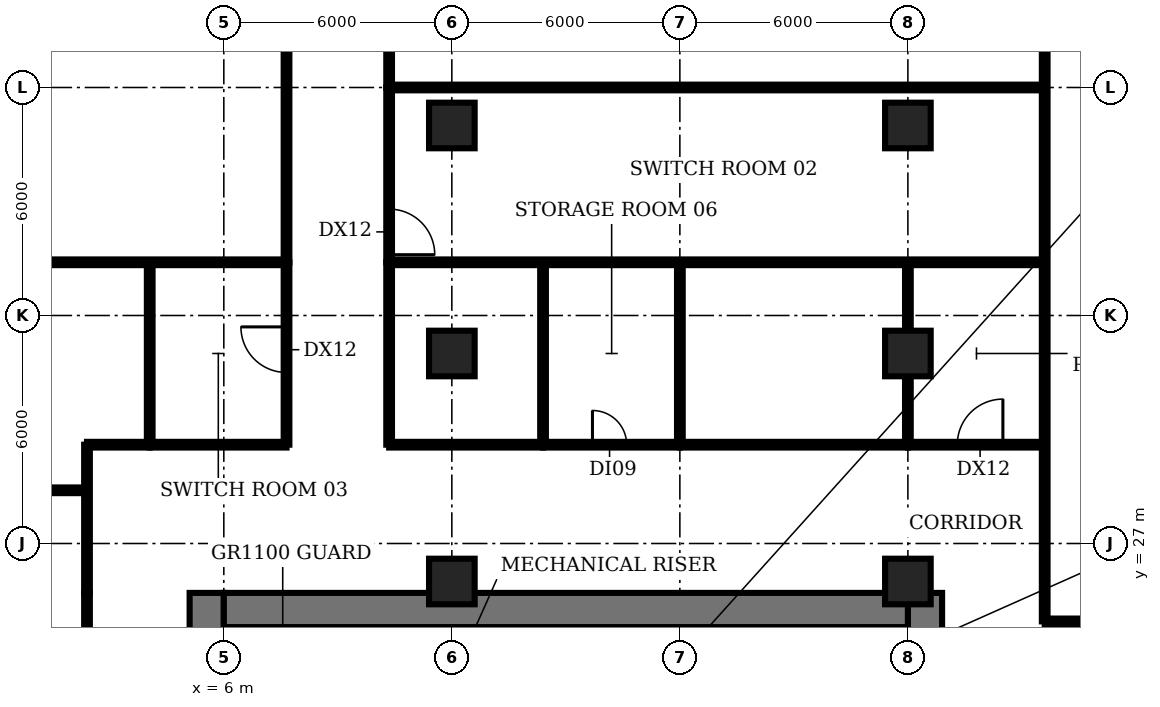
"""IFC4 building model, lengths in metres.
Left out: names, types, materials, properties, quantities, classifications, styles, units other than length and angle.
Written with IfcOpenShell. Run it as: python <this file> out.ifc"""

import sys

from ifc_helpers import new_model, si_unit, direction, frame, frame_2d, origin, origin_2d, place, context, subcontext, project, spatial, rectangle, extrude, element, fill, save


model = new_model("IFC4")
c1 = context("Model", 3, precision=1e-05, world=origin(), true_north=direction((0.0, 1.0)))
c2 = subcontext(c1, "Body", "Model", "MODEL_VIEW")
j1 = project(units=[si_unit("LENGTHUNIT", "METRE"), si_unit("PLANEANGLEUNIT", "RADIAN")], contexts=[c1])
p1 = place(None, origin())
s1 = spatial("IfcSite", under=j1, at=p1, CompositionType="ELEMENT")
p2 = place(p1, origin())
s2 = spatial("IfcBuilding", under=s1, at=p2, CompositionType="ELEMENT")
p3 = place(p2, frame((0.0, 0.0, -6.0)))
s3 = spatial("IfcBuildingStorey", under=s2, at=p3, CompositionType="ELEMENT", Elevation=-6.0)
for number, where, z_axis, x_axis in (
    (1, (12.0, 26.0, -0.3), (0.0, 0.0, 1.0), (1.0, 0.0, 0.0)),
    (2, (12.0, 32.0, -0.3), (0.0, 0.0, 1.0), (1.0, 0.0, 0.0)),
    (3, (12.0, 38.0, -0.3), (0.0, 0.0, 1.0), (1.0, 0.0, 0.0)),
    (4, (24.0, 26.0, -0.3), (0.0, 0.0, 1.0), (1.0, 0.0, 0.0)),
    (5, (24.0, 32.0, -0.3), (0.0, 0.0, 1.0), (1.0, 0.0, 0.0)),
    (6, (24.0, 38.0, -0.3), (0.0, 0.0, 1.0), (1.0, 0.0, 0.0)),
):
    element("IfcColumn", number, at=place(p3, frame(where, z_axis=z_axis, x_axis=x_axis)), inside=s3, PredefinedType="COLUMN", context=c2, shape_type="SweptSolid", body=[
        extrude(rectangle(XDim=1.2, YDim=1.2, at=origin_2d()), origin(), (0.0, 0.0, 1.0), 5.95),
    ])
p4 = place(p3, frame((9.275, 18.375, 0.0), z_axis=(0.0, 0.0, 1.0), x_axis=(0.0, 1.0, 0.0)))
e7 = element("IfcWall", 7, at=p4, inside=s3, PredefinedType="SHEAR", context=c2, shape_type="SweptSolid", body=[
    extrude(rectangle(XDim=6.425, YDim=0.25, at=frame_2d((3.212, 0.0))), origin(), (0.0, 0.0, 1.0), 5.65),
])
for number, where, z_axis, x_axis in (
    (8, (15.1, 22.9, 0.0), (0.0, 0.0, 1.0), (0.0, 1.0, 0.0)),
    (9, (20.7, 22.9, 0.0), (0.0, 0.0, 1.0), (0.0, 1.0, 0.0)),
):
    element("IfcWall", number, at=place(p3, frame(where, z_axis=z_axis, x_axis=x_axis)), inside=s3, PredefinedType="SHEAR", context=c2, shape_type="SweptSolid", body=[
        extrude(rectangle(XDim=1.9, YDim=0.2, at=frame_2d((0.95, 0.0))), origin(), (0.0, 0.0, 1.0), 5.65),
    ])
p5 = place(p3, frame((5.55, 4.5, 0.0), z_axis=(0.0, 0.0, 1.0), x_axis=(0.0, 1.0, 0.0)))
e10 = element("IfcWall", 10, at=p5, inside=s3, PredefinedType="SHEAR", context=c2, shape_type="SweptSolid", body=[
    extrude(rectangle(XDim=21.2, YDim=0.9, at=frame_2d((10.6, 0.0))), origin(), (0.0, 0.0, 1.0), 5.65),
])
p6 = place(p5, frame((7.6, 0.0, 0.0)))
e11 = element("IfcOpeningElement", 11, at=p6, cuts=e10, PredefinedType="OPENING", context=c2, shape_type="SweptSolid", body=[
    extrude(rectangle(XDim=1.2, YDim=2.1, at=frame_2d((0.6, 1.05))), frame((0.0, 0.46, 0.0), z_axis=(0.0, -1.0, 0.0), x_axis=(1.0, 0.0, 0.0)), (0.0, 0.0, 1.0), 0.92),
])
p7 = place(p5, frame((14.15, 0.0, 0.0)))
e12 = element("IfcOpeningElement", 12, at=p7, cuts=e10, PredefinedType="OPENING", context=c2, shape_type="SweptSolid", body=[
    extrude(rectangle(XDim=1.2, YDim=2.1, at=frame_2d((0.6, 1.05))), frame((0.0, 0.46, 0.0), z_axis=(0.0, -1.0, 0.0), x_axis=(1.0, 0.0, 0.0)), (0.0, 0.0, 1.0), 0.92),
])
p8 = place(p3, frame((24.45, 25.7, 0.0), z_axis=(0.0, 0.0, 1.0), x_axis=(0.0, -1.0, 0.0)))
e13 = element("IfcWall", 13, at=p8, inside=s3, PredefinedType="SHEAR", context=c2, shape_type="SweptSolid", body=[
    extrude(rectangle(XDim=21.2, YDim=0.9, at=frame_2d((10.6, 0.0))), origin(), (0.0, 0.0, 1.0), 5.65),
])
p9 = place(p8, frame((12.45, 0.0, 0.0)))
e14 = element("IfcOpeningElement", 14, at=p9, cuts=e13, PredefinedType="OPENING", context=c2, shape_type="SweptSolid", body=[
    extrude(rectangle(XDim=0.9, YDim=2.1, at=frame_2d((0.45, 1.05))), frame((0.0, 0.46, 0.0), z_axis=(0.0, -1.0, 0.0), x_axis=(1.0, 0.0, 0.0)), (0.0, 0.0, 1.0), 0.92),
])
p10 = place(p8, frame((6.45, 0.0, 0.0)))
e15 = element("IfcOpeningElement", 15, at=p10, cuts=e13, PredefinedType="OPENING", context=c2, shape_type="SweptSolid", body=[
    extrude(rectangle(XDim=2.0, YDim=2.1, at=frame_2d((1.0, 1.05))), frame((0.0, 0.46, 0.0), z_axis=(0.0, -1.0, 0.0), x_axis=(1.0, 0.0, 0.0)), (0.0, 0.0, 1.0), 0.92),
])
p11 = place(p3, frame((6.0, 25.25, 0.0), z_axis=(0.0, 0.0, 1.0), x_axis=(1.0, 0.0, 0.0)))
e16 = element("IfcWall", 16, at=p11, inside=s3, PredefinedType="SHEAR", context=c2, shape_type="SweptSolid", body=[
    extrude(rectangle(XDim=18.0, YDim=0.9, at=frame_2d((9.0, 0.0))), origin(), (0.0, 0.0, 1.0), 5.65),
])
p12 = place(p3, frame((-7.09, 28.4, 0.0), z_axis=(0.0, 0.0, 1.0), x_axis=(1.0, 0.0, 0.0)))
e17 = element("IfcWall", 17, at=p12, inside=s3, PredefinedType="PARTITIONING", context=c2, shape_type="SweptSolid", body=[
    extrude(rectangle(XDim=9.49, YDim=0.15, at=frame_2d((4.745, 0.0))), origin(), (0.0, 0.0, 1.0), 4.7),
])
p13 = place(p3, frame((-7.09, 34.4, 0.0), z_axis=(0.0, 0.0, 1.0), x_axis=(1.0, 0.0, 0.0)))
e18 = element("IfcWall", 18, at=p13, inside=s3, PredefinedType="PARTITIONING", context=c2, shape_type="SweptSolid", body=[
    extrude(rectangle(XDim=14.74, YDim=0.15, at=frame_2d((7.37, 0.0))), origin(), (0.0, 0.0, 1.0), 4.7),
])
p14 = place(p3, frame((2.4, 4.5, 0.0), z_axis=(0.0, 0.0, 1.0), x_axis=(0.0, 1.0, 0.0)))
e19 = element("IfcWall", 19, at=p14, inside=s3, PredefinedType="PARTITIONING", context=c2, shape_type="SweptSolid", body=[
    extrude(rectangle(XDim=21.2, YDim=0.15, at=frame_2d((10.6, 0.0))), origin(), (0.0, 0.0, 1.0), 4.7),
])
p15 = place(p14, frame((11.1, 0.0, 0.0)))
e20 = element("IfcOpeningElement", 20, at=p15, cuts=e19, PredefinedType="OPENING", context=c2, shape_type="SweptSolid", body=[
    extrude(rectangle(XDim=0.9, YDim=2.1, at=frame_2d((0.45, 1.05))), frame((0.0, 0.085, 0.0), z_axis=(0.0, -1.0, 0.0), x_axis=(1.0, 0.0, 0.0)), (0.0, 0.0, 1.0), 0.17),
])
p16 = place(p3, frame((2.4, 25.7, 0.0), z_axis=(0.0, 0.0, 1.0), x_axis=(0.0, 1.0, 0.0)))
e21 = element("IfcWall", 21, at=p16, inside=s3, PredefinedType="PARTITIONING", context=c2, shape_type="SweptSolid", body=[
    extrude(rectangle(XDim=3.9, YDim=0.15, at=frame_2d((1.95, 0.0))), origin(), (0.0, 0.0, 1.0), 4.7),
])
p17 = place(p3, frame((2.4, 29.6, 0.0), z_axis=(0.0, 0.0, 1.0), x_axis=(1.0, 0.0, 0.0)))
e22 = element("IfcWall", 22, at=p17, inside=s3, PredefinedType="PARTITIONING", context=c2, shape_type="SweptSolid", body=[
    extrude(rectangle(XDim=1.65, YDim=0.15, at=frame_2d((0.825, 0.0))), origin(), (0.0, 0.0, 1.0), 4.7),
])
p18 = place(p3, frame((4.05, 29.6, 0.0), z_axis=(0.0, 0.0, 1.0), x_axis=(0.0, 1.0, 0.0)))
e23 = element("IfcWall", 23, at=p18, inside=s3, PredefinedType="PARTITIONING", context=c2, shape_type="SweptSolid", body=[
    extrude(rectangle(XDim=4.8, YDim=0.15, at=frame_2d((2.4, 0.0))), origin(), (0.0, 0.0, 1.0), 4.7),
])
p19 = place(p3, frame((4.05, 29.6, 0.0), z_axis=(0.0, 0.0, 1.0), x_axis=(1.0, 0.0, 0.0)))
e24 = element("IfcWall", 24, at=p19, inside=s3, PredefinedType="PARTITIONING", context=c2, shape_type="SweptSolid", body=[
    extrude(rectangle(XDim=3.6, YDim=0.15, at=frame_2d((1.8, 0.0))), origin(), (0.0, 0.0, 1.0), 4.7),
])
p20 = place(p3, frame((7.65, 29.6, 0.0), z_axis=(0.0, 0.0, 1.0), x_axis=(0.0, 1.0, 0.0)))
e25 = element("IfcWall", 25, at=p20, inside=s3, PredefinedType="PARTITIONING", context=c2, shape_type="SweptSolid", body=[
    extrude(rectangle(XDim=4.8, YDim=0.15, at=frame_2d((2.4, 0.0))), origin(), (0.0, 0.0, 1.0), 4.7),
])
p21 = place(p20, frame((1.9, 0.0, 0.0)))
e26 = element("IfcOpeningElement", 26, at=p21, cuts=e25, PredefinedType="OPENING", context=c2, shape_type="SweptSolid", body=[
    extrude(rectangle(XDim=1.2, YDim=2.1, at=frame_2d((0.6, 1.05))), frame((0.0, 0.085, 0.0), z_axis=(0.0, -1.0, 0.0), x_axis=(1.0, 0.0, 0.0)), (0.0, 0.0, 1.0), 0.17),
])
p22 = place(p3, frame((7.65, 34.4, 0.0), z_axis=(0.0, 0.0, 1.0), x_axis=(0.0, 1.0, 0.0)))
e27 = element("IfcWall", 27, at=p22, inside=s3, PredefinedType="PARTITIONING", context=c2, shape_type="SweptSolid", body=[
    extrude(rectangle(XDim=16.6, YDim=0.15, at=frame_2d((8.3, 0.0))), origin(), (0.0, 0.0, 1.0), 4.7),
])
p23 = place(p22, frame((7.7, 0.0, 0.0)))
e28 = element("IfcOpeningElement", 28, at=p23, cuts=e27, PredefinedType="OPENING", context=c2, shape_type="SweptSolid", body=[
    extrude(rectangle(XDim=1.2, YDim=2.1, at=frame_2d((0.6, 1.05))), frame((0.0, 0.085, 0.0), z_axis=(0.0, -1.0, 0.0), x_axis=(1.0, 0.0, 0.0)), (0.0, 0.0, 1.0), 0.17),
])
p24 = place(p3, frame((10.35, 29.6, 0.0), z_axis=(0.0, 0.0, 1.0), x_axis=(0.0, 1.0, 0.0)))
e29 = element("IfcWall", 29, at=p24, inside=s3, PredefinedType="PARTITIONING", context=c2, shape_type="SweptSolid", body=[
    extrude(rectangle(XDim=4.8, YDim=0.15, at=frame_2d((2.4, 0.0))), origin(), (0.0, 0.0, 1.0), 4.7),
])
p25 = place(p3, frame((10.35, 29.6, 0.0), z_axis=(0.0, 0.0, 1.0), x_axis=(1.0, 0.0, 0.0)))
e30 = element("IfcWall", 30, at=p25, inside=s3, PredefinedType="PARTITIONING", context=c2, shape_type="SweptSolid", body=[
    extrude(rectangle(XDim=4.05, YDim=0.15, at=frame_2d((2.025, 0.0))), origin(), (0.0, 0.0, 1.0), 4.7),
])
p26 = place(p3, frame((10.35, 34.4, 0.0), z_axis=(0.0, 0.0, 1.0), x_axis=(1.0, 0.0, 0.0)))
e31 = element("IfcWall", 31, at=p26, inside=s3, PredefinedType="PARTITIONING", context=c2, shape_type="SweptSolid", body=[
    extrude(rectangle(XDim=17.25, YDim=0.15, at=frame_2d((8.625, 0.0))), origin(), (0.0, 0.0, 1.0), 4.7),
])
p27 = place(p3, frame((10.35, 39.0, 0.0), z_axis=(0.0, 0.0, 1.0), x_axis=(0.0, -1.0, 0.0)))
e32 = element("IfcWall", 32, at=p27, inside=s3, PredefinedType="PARTITIONING", context=c2, shape_type="SweptSolid", body=[
    extrude(rectangle(XDim=4.6, YDim=0.15, at=frame_2d((2.3, 0.0))), origin(), (0.0, 0.0, 1.0), 4.7),
])
p28 = place(p27, frame((3.2, 0.0, 0.0)))
e33 = element("IfcOpeningElement", 33, at=p28, cuts=e32, PredefinedType="OPENING", context=c2, shape_type="SweptSolid", body=[
    extrude(rectangle(XDim=1.2, YDim=2.1, at=frame_2d((0.6, 1.05))), frame((0.0, 0.085, 0.0), z_axis=(0.0, -1.0, 0.0), x_axis=(1.0, 0.0, 0.0)), (0.0, 0.0, 1.0), 0.17),
])
p29 = place(p3, frame((10.35, 39.0, 0.0), z_axis=(0.0, 0.0, 1.0), x_axis=(1.0, 0.0, 0.0)))
e34 = element("IfcWall", 34, at=p29, inside=s3, PredefinedType="PARTITIONING", context=c2, shape_type="SweptSolid", body=[
    extrude(rectangle(XDim=17.25, YDim=0.15, at=frame_2d((8.625, 0.0))), origin(), (0.0, 0.0, 1.0), 4.7),
])
p30 = place(p3, frame((10.35, 57.0, 0.0), z_axis=(0.0, 0.0, 1.0), x_axis=(0.0, -1.0, 0.0)))
e35 = element("IfcWall", 35, at=p30, inside=s3, PredefinedType="PARTITIONING", context=c2, shape_type="SweptSolid", body=[
    extrude(rectangle(XDim=18.0, YDim=0.15, at=frame_2d((9.0, 0.0))), origin(), (0.0, 0.0, 1.0), 4.7),
])
p31 = place(p30, frame((9.1, 0.0, 0.0)))
e36 = element("IfcOpeningElement", 36, at=p31, cuts=e35, PredefinedType="OPENING", context=c2, shape_type="SweptSolid", body=[
    extrude(rectangle(XDim=1.2, YDim=2.1, at=frame_2d((0.6, 1.05))), frame((0.0, 0.085, 0.0), z_axis=(0.0, -1.0, 0.0), x_axis=(1.0, 0.0, 0.0)), (0.0, 0.0, 1.0), 0.17),
])
p32 = place(p3, frame((14.4, 29.6, 0.0), z_axis=(0.0, 0.0, 1.0), x_axis=(0.0, 1.0, 0.0)))
e37 = element("IfcWall", 37, at=p32, inside=s3, PredefinedType="PARTITIONING", context=c2, shape_type="SweptSolid", body=[
    extrude(rectangle(XDim=4.8, YDim=0.15, at=frame_2d((2.4, 0.0))), origin(), (0.0, 0.0, 1.0), 4.7),
])
p33 = place(p3, frame((14.4, 29.6, 0.0), z_axis=(0.0, 0.0, 1.0), x_axis=(1.0, 0.0, 0.0)))
e38 = element("IfcWall", 38, at=p33, inside=s3, PredefinedType="PARTITIONING", context=c2, shape_type="SweptSolid", body=[
    extrude(rectangle(XDim=3.6, YDim=0.15, at=frame_2d((1.8, 0.0))), origin(), (0.0, 0.0, 1.0), 4.7),
])
p34 = place(p33, frame((1.3, 0.0, 0.0)))
e39 = element("IfcOpeningElement", 39, at=p34, cuts=e38, PredefinedType="OPENING", context=c2, shape_type="SweptSolid", body=[
    extrude(rectangle(XDim=0.9, YDim=2.1, at=frame_2d((0.45, 1.05))), frame((0.0, 0.085, 0.0), z_axis=(0.0, -1.0, 0.0), x_axis=(1.0, 0.0, 0.0)), (0.0, 0.0, 1.0), 0.17),
])
p35 = place(p3, frame((18.0, 29.6, 0.0), z_axis=(0.0, 0.0, 1.0), x_axis=(0.0, 1.0, 0.0)))
e40 = element("IfcWall", 40, at=p35, inside=s3, PredefinedType="PARTITIONING", context=c2, shape_type="SweptSolid", body=[
    extrude(rectangle(XDim=4.8, YDim=0.15, at=frame_2d((2.4, 0.0))), origin(), (0.0, 0.0, 1.0), 4.7),
])
p36 = place(p3, frame((18.0, 29.6, 0.0), z_axis=(0.0, 0.0, 1.0), x_axis=(1.0, 0.0, 0.0)))
e41 = element("IfcWall", 41, at=p36, inside=s3, PredefinedType="PARTITIONING", context=c2, shape_type="SweptSolid", body=[
    extrude(rectangle(XDim=6.0, YDim=0.15, at=frame_2d((3.0, 0.0))), origin(), (0.0, 0.0, 1.0), 4.7),
])
p37 = place(p3, frame((24.0, 29.6, 0.0), z_axis=(0.0, 0.0, 1.0), x_axis=(0.0, 1.0, 0.0)))
e42 = element("IfcWall", 42, at=p37, inside=s3, PredefinedType="PARTITIONING", context=c2, shape_type="SweptSolid", body=[
    extrude(rectangle(XDim=4.8, YDim=0.15, at=frame_2d((2.4, 0.0))), origin(), (0.0, 0.0, 1.0), 4.7),
])
p38 = place(p3, frame((24.0, 29.6, 0.0), z_axis=(0.0, 0.0, 1.0), x_axis=(1.0, 0.0, 0.0)))
e43 = element("IfcWall", 43, at=p38, inside=s3, PredefinedType="PARTITIONING", context=c2, shape_type="SweptSolid", body=[
    extrude(rectangle(XDim=3.6, YDim=0.15, at=frame_2d((1.8, 0.0))), origin(), (0.0, 0.0, 1.0), 4.7),
])
p39 = place(p38, frame((1.3, 0.0, 0.0)))
e44 = element("IfcOpeningElement", 44, at=p39, cuts=e43, PredefinedType="OPENING", context=c2, shape_type="SweptSolid", body=[
    extrude(rectangle(XDim=1.2, YDim=2.1, at=frame_2d((0.6, 1.05))), frame((0.0, 0.085, 0.0), z_axis=(0.0, -1.0, 0.0), x_axis=(1.0, 0.0, 0.0)), (0.0, 0.0, 1.0), 0.17),
])
p40 = place(p3, frame((27.6, 24.95, 0.0), z_axis=(0.0, 0.0, 1.0), x_axis=(0.0, 1.0, 0.0)))
e45 = element("IfcWall", 45, at=p40, inside=s3, PredefinedType="PARTITIONING", context=c2, shape_type="SweptSolid", body=[
    extrude(rectangle(XDim=45.14, YDim=0.15, at=frame_2d((22.57, 0.0))), origin(), (0.0, 0.0, 1.0), 4.7),
])
p41 = place(p3, frame((27.6, 24.95, 0.0), z_axis=(0.0, 0.0, 1.0), x_axis=(1.0, 0.0, 0.0)))
e46 = element("IfcWall", 46, at=p41, inside=s3, PredefinedType="PARTITIONING", context=c2, shape_type="SweptSolid", body=[
    extrude(rectangle(XDim=52.4, YDim=0.15, at=frame_2d((26.2, 0.0))), origin(), (0.0, 0.0, 1.0), 4.7),
])
p42 = place(p41, frame((25.5, 0.0, 0.0)))
e47 = element("IfcOpeningElement", 47, at=p42, cuts=e46, PredefinedType="OPENING", context=c2, shape_type="SweptSolid", body=[
    extrude(rectangle(XDim=1.2, YDim=2.1, at=frame_2d((0.6, 1.05))), frame((0.0, 0.085, 0.0), z_axis=(0.0, -1.0, 0.0), x_axis=(1.0, 0.0, 0.0)), (0.0, 0.0, 1.0), 0.17),
])
p43 = place(p21, origin())
e48 = element("IfcDoor", 48, at=p43, inside=s3, OperationType="SINGLE_SWING_RIGHT", PredefinedType="DOOR", context=c2, shape_type="SweptSolid", body=[
    extrude(rectangle(XDim=1.2, YDim=2.1, at=frame_2d((0.6, 1.05))), frame((0.0, 0.025, 0.0), z_axis=(0.0, -1.0, 0.0), x_axis=(1.0, 0.0, 0.0)), (0.0, 0.0, 1.0), 0.05),
])
fill(e26, e48)
p44 = place(p28, origin())
e49 = element("IfcDoor", 49, at=p44, inside=s3, OperationType="SINGLE_SWING_RIGHT", PredefinedType="DOOR", context=c2, shape_type="SweptSolid", body=[
    extrude(rectangle(XDim=1.2, YDim=2.1, at=frame_2d((0.6, 1.05))), frame((0.0, 0.025, 0.0), z_axis=(0.0, -1.0, 0.0), x_axis=(1.0, 0.0, 0.0)), (0.0, 0.0, 1.0), 0.05),
])
fill(e33, e49)
p45 = place(p34, origin())
e50 = element("IfcDoor", 50, at=p45, inside=s3, OperationType="SINGLE_SWING_LEFT", PredefinedType="DOOR", context=c2, shape_type="SweptSolid", body=[
    extrude(rectangle(XDim=0.9, YDim=2.1, at=frame_2d((0.45, 1.05))), frame((0.0, 0.025, 0.0), z_axis=(0.0, -1.0, 0.0), x_axis=(1.0, 0.0, 0.0)), (0.0, 0.0, 1.0), 0.05),
])
fill(e39, e50)
p46 = place(p39, origin())
e51 = element("IfcDoor", 51, at=p46, inside=s3, OperationType="SINGLE_SWING_RIGHT", PredefinedType="DOOR", context=c2, shape_type="SweptSolid", body=[
    extrude(rectangle(XDim=1.2, YDim=2.1, at=frame_2d((0.6, 1.05))), frame((0.0, 0.025, 0.0), z_axis=(0.0, -1.0, 0.0), x_axis=(1.0, 0.0, 0.0)), (0.0, 0.0, 1.0), 0.05),
])
fill(e44, e51)
save(model, sys.argv[1])
